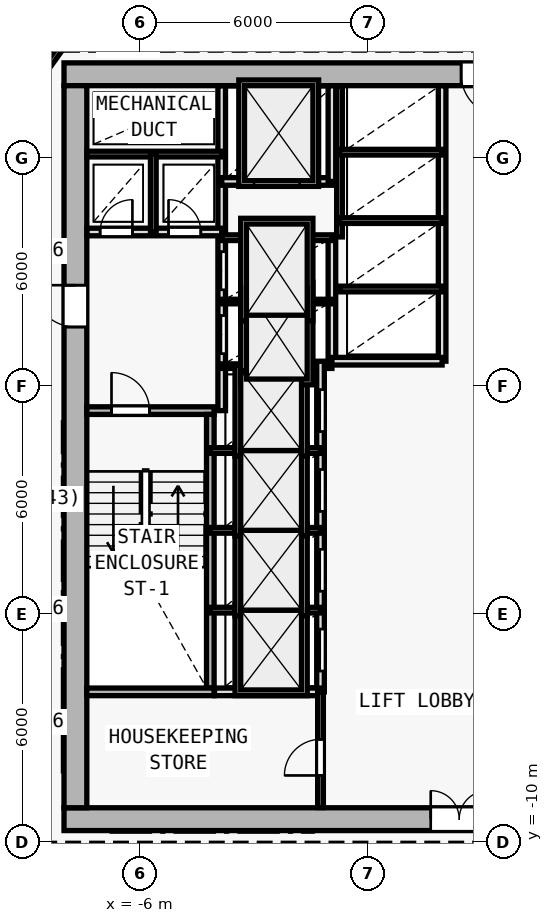
"""IFC4 building model, lengths in metres.
Left out: names, types, materials, properties, quantities, classifications, styles, units other than length and angle.
Written with IfcOpenShell. Run it as: python <this file> out.ifc"""

import sys

from ifc_helpers import new_model, si_unit, direction, frame, frame_2d, origin, origin_2d, place, context, subcontext, project, spatial, rectangle, i_section, extrude, element, fill, save


model = new_model("IFC4")
c1 = context("Model", 3, precision=1e-05, world=origin(), true_north=direction((0.0, 1.0)))
c2 = subcontext(c1, "Body", "Model", "MODEL_VIEW")
j1 = project(units=[si_unit("LENGTHUNIT", "METRE"), si_unit("PLANEANGLEUNIT", "RADIAN")], contexts=[c1])
p1 = place(None, origin())
s1 = spatial("IfcSite", under=j1, at=p1, CompositionType="ELEMENT")
p2 = place(p1, origin())
s2 = spatial("IfcBuilding", under=s1, at=p2, CompositionType="ELEMENT")
p3 = place(p2, frame((0.0, 0.0, 100.5)))
s3 = spatial("IfcBuildingStorey", under=s2, at=p3, CompositionType="ELEMENT", Elevation=100.5)
for number, where, z_axis, x_axis in (
    (1, (-7.7, -9.4, 0.0), (0.0, 0.0, 1.0), (1.0, 0.0, 0.0)),
    (2, (-7.7, 10.2, 0.0), (0.0, 0.0, 1.0), (1.0, 0.0, 0.0)),
    (3, (0.0, -9.4, 0.0), (0.0, 0.0, 1.0), (1.0, 0.0, 0.0)),
    (4, (-7.7, 2.0, 0.0), (0.0, 0.0, 1.0), (1.0, 0.0, 0.0)),
):
    element("IfcColumn", number, at=place(p3, frame(where, z_axis=z_axis, x_axis=x_axis)), inside=s3, PredefinedType="COLUMN", context=c2, shape_type="SweptSolid", body=[
        extrude(i_section(OverallWidth=0.409, OverallDepth=0.425, WebThickness=0.021, FlangeThickness=0.034, FilletRadius=0.015, at=origin_2d()), origin(), (0.0, 0.0, 1.0), 3.6),
    ])
p4 = place(p3, frame((-8.0, -9.4, 0.0), z_axis=(0.0, 0.0, 1.0), x_axis=(1.0, 0.0, 0.0)))
e5 = element("IfcWall", 5, at=p4, inside=s3, PredefinedType="SHEAR", context=c2, shape_type="SweptSolid", body=[
    extrude(rectangle(XDim=16.0, YDim=0.6, at=frame_2d((8.0, 0.0))), origin(), (0.0, 0.0, 1.0), 3.35),
])
p5 = place(p4, frame((9.65, 0.0, 0.0)))
e6 = element("IfcOpeningElement", 6, at=p5, cuts=e5, PredefinedType="OPENING", context=c2, shape_type="SweptSolid", body=[
    extrude(rectangle(XDim=1.5, YDim=2.2, at=frame_2d((0.75, 1.1))), frame((0.0, 0.31, 0.0), z_axis=(0.0, -1.0, 0.0), x_axis=(1.0, 0.0, 0.0)), (0.0, 0.0, 1.0), 0.62),
])
p6 = place(p3, frame((8.0, 10.2, 0.0), z_axis=(0.0, 0.0, 1.0), x_axis=(-1.0, 0.0, 0.0)))
e7 = element("IfcWall", 7, at=p6, inside=s3, PredefinedType="SHEAR", context=c2, shape_type="SweptSolid", body=[
    extrude(rectangle(XDim=16.0, YDim=0.6, at=frame_2d((8.0, 0.0))), origin(), (0.0, 0.0, 1.0), 3.35),
])
p7 = place(p6, frame((4.45, 0.0, 0.0)))
e8 = element("IfcOpeningElement", 8, at=p7, cuts=e7, PredefinedType="OPENING", context=c2, shape_type="SweptSolid", body=[
    extrude(rectangle(XDim=1.1, YDim=2.15, at=frame_2d((0.55, 1.075))), frame((0.0, 0.31, 0.0), z_axis=(0.0, -1.0, 0.0), x_axis=(1.0, 0.0, 0.0)), (0.0, 0.0, 1.0), 0.62),
])
p8 = place(p3, frame((-7.7, -9.1, 0.0), z_axis=(0.0, 0.0, 1.0), x_axis=(0.0, 1.0, 0.0)))
e9 = element("IfcWall", 9, at=p8, inside=s3, PredefinedType="SHEAR", context=c2, shape_type="SweptSolid", body=[
    extrude(rectangle(XDim=19.0, YDim=0.6, at=frame_2d((9.5, 0.0))), origin(), (0.0, 0.0, 1.0), 3.35),
])
p9 = place(p8, frame((12.65, 0.0, 0.0)))
e10 = element("IfcOpeningElement", 10, at=p9, cuts=e9, PredefinedType="OPENING", context=c2, shape_type="SweptSolid", body=[
    extrude(rectangle(XDim=1.1, YDim=2.15, at=frame_2d((0.55, 1.075))), frame((0.0, 0.31, 0.0), z_axis=(0.0, -1.0, 0.0), x_axis=(1.0, 0.0, 0.0)), (0.0, 0.0, 1.0), 0.62),
])
p10 = place(p3, frame((-7.4, 1.35, 0.0), z_axis=(0.0, 0.0, 1.0), x_axis=(1.0, 0.0, 0.0)))
e11 = element("IfcWall", 11, at=p10, inside=s3, PredefinedType="SOLIDWALL", context=c2, shape_type="SweptSolid", body=[
    extrude(rectangle(XDim=3.35, YDim=0.2, at=frame_2d((1.675, 0.0))), origin(), (0.0, 0.0, 1.0), 3.35),
])
p11 = place(p10, frame((0.65, 0.0, 0.0)))
e12 = element("IfcOpeningElement", 12, at=p11, cuts=e11, PredefinedType="OPENING", context=c2, shape_type="SweptSolid", body=[
    extrude(rectangle(XDim=1.0, YDim=2.15, at=frame_2d((0.5, 1.075))), frame((0.0, 0.11, 0.0), z_axis=(0.0, -1.0, 0.0), x_axis=(1.0, 0.0, 0.0)), (0.0, 0.0, 1.0), 0.22),
])
p12 = place(p3, frame((-4.15, -5.95, 0.0), z_axis=(0.0, 0.0, 1.0), x_axis=(0.0, 1.0, 0.0)))
e13 = element("IfcWall", 13, at=p12, inside=s3, PredefinedType="SOLIDWALL", context=c2, shape_type="SweptSolid", body=[
    extrude(rectangle(XDim=7.2, YDim=0.2, at=frame_2d((3.6, 0.0))), origin(), (0.0, 0.0, 1.0), 3.35),
])
p13 = place(p3, frame((-3.85, 1.35, 0.0), z_axis=(0.0, 0.0, 1.0), x_axis=(0.0, 1.0, 0.0)))
e14 = element("IfcWall", 14, at=p13, inside=s3, PredefinedType="SOLIDWALL", context=c2, shape_type="SweptSolid", body=[
    extrude(rectangle(XDim=8.545, YDim=0.2, at=frame_2d((4.272, 0.0))), origin(), (0.0, 0.0, 1.0), 3.35),
])
p14 = place(p13, frame((1.5, 0.0, 0.0)))
e15 = element("IfcOpeningElement", 15, at=p14, cuts=e14, PredefinedType="OPENING", context=c2, shape_type="SweptSolid", body=[
    extrude(rectangle(XDim=1.0, YDim=2.15, at=frame_2d((0.5, 1.075))), frame((0.0, 0.11, 0.0), z_axis=(0.0, -1.0, 0.0), x_axis=(1.0, 0.0, 0.0)), (0.0, 0.0, 1.0), 0.22),
])
p15 = place(p13, frame((3.18, 0.0, 0.0)))
e16 = element("IfcOpeningElement", 16, at=p15, cuts=e14, PredefinedType="OPENING", context=c2, shape_type="SweptSolid", body=[
    extrude(rectangle(XDim=1.0, YDim=2.15, at=frame_2d((0.5, 1.075))), frame((0.0, 0.11, 0.0), z_axis=(0.0, -1.0, 0.0), x_axis=(1.0, 0.0, 0.0)), (0.0, 0.0, 1.0), 0.22),
])
p16 = place(p3, frame((-7.395, 6.05, 0.0), z_axis=(0.0, 0.0, 1.0), x_axis=(1.0, 0.0, 0.0)))
e17 = element("IfcWall", 17, at=p16, inside=s3, PredefinedType="SOLIDWALL", context=c2, shape_type="SweptSolid", body=[
    extrude(rectangle(XDim=3.545, YDim=0.2, at=frame_2d((1.772, 0.0))), origin(), (0.0, 0.0, 1.0), 3.35),
])
p17 = place(p16, frame((0.345, 0.0, 0.0)))
e18 = element("IfcOpeningElement", 18, at=p17, cuts=e17, PredefinedType="OPENING", context=c2, shape_type="SweptSolid", body=[
    extrude(rectangle(XDim=0.85, YDim=2.1, at=frame_2d((0.425, 1.05))), frame((0.0, 0.11, 0.0), z_axis=(0.0, -1.0, 0.0), x_axis=(1.0, 0.0, 0.0)), (0.0, 0.0, 1.0), 0.22),
])
p18 = place(p16, frame((2.145, 0.0, 0.0)))
e19 = element("IfcOpeningElement", 19, at=p18, cuts=e17, PredefinedType="OPENING", context=c2, shape_type="SweptSolid", body=[
    extrude(rectangle(XDim=0.85, YDim=2.1, at=frame_2d((0.425, 1.05))), frame((0.0, 0.11, 0.0), z_axis=(0.0, -1.0, 0.0), x_axis=(1.0, 0.0, 0.0)), (0.0, 0.0, 1.0), 0.22),
])
p19 = place(p3, frame((-7.395, 8.1, 0.0), z_axis=(0.0, 0.0, 1.0), x_axis=(1.0, 0.0, 0.0)))
e20 = element("IfcWall", 20, at=p19, inside=s3, PredefinedType="PARTITIONING", context=c2, shape_type="SweptSolid", body=[
    extrude(rectangle(XDim=3.545, YDim=0.15, at=frame_2d((1.772, 0.0))), origin(), (0.0, 0.0, 1.0), 3.35),
])
p20 = place(p3, frame((-5.65, 6.05, 0.0), z_axis=(0.0, 0.0, 1.0), x_axis=(0.0, 1.0, 0.0)))
e21 = element("IfcWall", 21, at=p20, inside=s3, PredefinedType="PARTITIONING", context=c2, shape_type="SweptSolid", body=[
    extrude(rectangle(XDim=2.05, YDim=0.15, at=frame_2d((1.025, 0.0))), origin(), (0.0, 0.0, 1.0), 3.35),
])
p21 = place(p3, frame((-0.95, 2.65, 0.0), z_axis=(0.0, 0.0, 1.0), x_axis=(0.0, 1.0, 0.0)))
e22 = element("IfcWall", 22, at=p21, inside=s3, PredefinedType="SOLIDWALL", context=c2, shape_type="SweptSolid", body=[
    extrude(rectangle(XDim=3.27, YDim=0.2, at=frame_2d((1.635, 0.0))), origin(), (0.0, 0.0, 1.0), 3.35),
])
for number, where, z_axis, x_axis in (
    (23, (-3.85, 2.52, 0.0), (0.0, 0.0, 1.0), (1.0, 0.0, 0.0)),
    (24, (-3.85, 4.22, 0.0), (0.0, 0.0, 1.0), (1.0, 0.0, 0.0)),
):
    element("IfcWall", number, at=place(p3, frame(where, z_axis=z_axis, x_axis=x_axis)), inside=s3, PredefinedType="PARTITIONING", context=c2, shape_type="SweptSolid", body=[
        extrude(rectangle(XDim=2.9, YDim=0.12, at=frame_2d((1.45, 0.0))), origin(), (0.0, 0.0, 1.0), 3.35),
    ])
p22 = place(p3, frame((-3.85, 5.9, 0.0), z_axis=(0.0, 0.0, 1.0), x_axis=(1.0, 0.0, 0.0)))
e25 = element("IfcWall", 25, at=p22, inside=s3, PredefinedType="PARTITIONING", context=c2, shape_type="SweptSolid", body=[
    extrude(rectangle(XDim=2.9, YDim=0.15, at=frame_2d((1.45, 0.0))), origin(), (0.0, 0.0, 1.0), 3.35),
])
p23 = place(p3, frame((-3.85, 7.38, 0.0), z_axis=(0.0, 0.0, 1.0), x_axis=(1.0, 0.0, 0.0)))
e26 = element("IfcWall", 26, at=p23, inside=s3, PredefinedType="SOLIDWALL", context=c2, shape_type="SweptSolid", body=[
    extrude(rectangle(XDim=2.9, YDim=0.2, at=frame_2d((1.45, 0.0))), origin(), (0.0, 0.0, 1.0), 3.35),
])
p24 = place(p23, frame((0.85, 0.0, 0.0)))
e27 = element("IfcOpeningElement", 27, at=p24, cuts=e26, PredefinedType="OPENING", context=c2, shape_type="SweptSolid", body=[
    extrude(rectangle(XDim=1.2, YDim=2.2, at=frame_2d((0.6, 1.1))), frame((0.0, 0.11, 0.0), z_axis=(0.0, -1.0, 0.0), x_axis=(1.0, 0.0, 0.0)), (0.0, 0.0, 1.0), 0.22),
])
p25 = place(p3, frame((-0.95, 7.38, 0.0), z_axis=(0.0, 0.0, 1.0), x_axis=(0.0, 1.0, 0.0)))
e28 = element("IfcWall", 28, at=p25, inside=s3, PredefinedType="SOLIDWALL", context=c2, shape_type="SweptSolid", body=[
    extrude(rectangle(XDim=2.515, YDim=0.2, at=frame_2d((1.258, 0.0))), origin(), (0.0, 0.0, 1.0), 3.35),
])
p26 = place(p3, frame((-1.25, -6.05, 0.0), z_axis=(0.0, 0.0, 1.0), x_axis=(0.0, 1.0, 0.0)))
e29 = element("IfcWall", 29, at=p26, inside=s3, PredefinedType="SOLIDWALL", context=c2, shape_type="SweptSolid", body=[
    extrude(rectangle(XDim=8.7, YDim=0.2, at=frame_2d((4.35, 0.0))), origin(), (0.0, 0.0, 1.0), 3.35),
])
p27 = place(p26, frame((0.55, 0.0, 0.0)))
e30 = element("IfcOpeningElement", 30, at=p27, cuts=e29, PredefinedType="OPENING", context=c2, shape_type="SweptSolid", body=[
    extrude(rectangle(XDim=1.1, YDim=2.15, at=frame_2d((0.55, 1.075))), frame((0.0, 0.11, 0.0), z_axis=(0.0, -1.0, 0.0), x_axis=(1.0, 0.0, 0.0)), (0.0, 0.0, 1.0), 0.22),
])
p28 = place(p26, frame((2.65, 0.0, 0.0)))
e31 = element("IfcOpeningElement", 31, at=p28, cuts=e29, PredefinedType="OPENING", context=c2, shape_type="SweptSolid", body=[
    extrude(rectangle(XDim=1.1, YDim=2.15, at=frame_2d((0.55, 1.075))), frame((0.0, 0.11, 0.0), z_axis=(0.0, -1.0, 0.0), x_axis=(1.0, 0.0, 0.0)), (0.0, 0.0, 1.0), 0.22),
])
p29 = place(p26, frame((4.75, 0.0, 0.0)))
e32 = element("IfcOpeningElement", 32, at=p29, cuts=e29, PredefinedType="OPENING", context=c2, shape_type="SweptSolid", body=[
    extrude(rectangle(XDim=1.1, YDim=2.15, at=frame_2d((0.55, 1.075))), frame((0.0, 0.11, 0.0), z_axis=(0.0, -1.0, 0.0), x_axis=(1.0, 0.0, 0.0)), (0.0, 0.0, 1.0), 0.22),
])
p30 = place(p26, frame((6.85, 0.0, 0.0)))
e33 = element("IfcOpeningElement", 33, at=p30, cuts=e29, PredefinedType="OPENING", context=c2, shape_type="SweptSolid", body=[
    extrude(rectangle(XDim=1.1, YDim=2.15, at=frame_2d((0.55, 1.075))), frame((0.0, 0.11, 0.0), z_axis=(0.0, -1.0, 0.0), x_axis=(1.0, 0.0, 0.0)), (0.0, 0.0, 1.0), 0.22),
])
for number, where, z_axis, x_axis in (
    (34, (-4.15, -3.9, 0.0), (0.0, 0.0, 1.0), (1.0, 0.0, 0.0)),
    (35, (-4.15, -1.8, 0.0), (0.0, 0.0, 1.0), (1.0, 0.0, 0.0)),
    (36, (-4.15, 0.3, 0.0), (0.0, 0.0, 1.0), (1.0, 0.0, 0.0)),
):
    element("IfcWall", number, at=place(p3, frame(where, z_axis=z_axis, x_axis=x_axis)), inside=s3, PredefinedType="PARTITIONING", context=c2, shape_type="SweptSolid", body=[
        extrude(rectangle(XDim=2.9, YDim=0.15, at=frame_2d((1.45, 0.0))), origin(), (0.0, 0.0, 1.0), 3.35),
    ])
p31 = place(p3, frame((1.95, 2.65, 0.0), z_axis=(0.0, 0.0, 1.0), x_axis=(0.0, 1.0, 0.0)))
e37 = element("IfcWall", 37, at=p31, inside=s3, PredefinedType="SOLIDWALL", context=c2, shape_type="SweptSolid", body=[
    extrude(rectangle(XDim=7.245, YDim=0.2, at=frame_2d((3.623, 0.0))), origin(), (0.0, 0.0, 1.0), 3.35),
])
p32 = place(p3, frame((-0.95, 2.65, 0.0), z_axis=(0.0, 0.0, 1.0), x_axis=(1.0, 0.0, 0.0)))
e38 = element("IfcWall", 38, at=p32, inside=s3, PredefinedType="SOLIDWALL", context=c2, shape_type="SweptSolid", body=[
    extrude(rectangle(XDim=2.9, YDim=0.2, at=frame_2d((1.45, 0.0))), origin(), (0.0, 0.0, 1.0), 3.35),
])
p33 = place(p3, frame((-0.75, 5.92, 0.0), z_axis=(0.0, 0.0, 1.0), x_axis=(0.0, 1.0, 0.0)))
e39 = element("IfcWall", 39, at=p33, inside=s3, PredefinedType="PARTITIONING", context=c2, shape_type="SweptSolid", body=[
    extrude(rectangle(XDim=3.975, YDim=0.15, at=frame_2d((1.988, 0.0))), origin(), (0.0, 0.0, 1.0), 3.35),
])
for number, where, z_axis, x_axis in (
    (40, (-0.75, 4.55, 0.0), (0.0, 0.0, 1.0), (1.0, 0.0, 0.0)),
    (41, (-0.75, 6.35, 0.0), (0.0, 0.0, 1.0), (1.0, 0.0, 0.0)),
    (42, (-0.75, 8.15, 0.0), (0.0, 0.0, 1.0), (1.0, 0.0, 0.0)),
):
    element("IfcWall", number, at=place(p3, frame(where, z_axis=z_axis, x_axis=x_axis)), inside=s3, PredefinedType="PARTITIONING", context=c2, shape_type="SweptSolid", body=[
        extrude(rectangle(XDim=2.7, YDim=0.15, at=frame_2d((1.35, 0.0))), origin(), (0.0, 0.0, 1.0), 3.35),
    ])
p34 = place(p3, frame((-7.4, -6.05, 0.0), z_axis=(0.0, 0.0, 1.0), x_axis=(1.0, 0.0, 0.0)))
e43 = element("IfcWall", 43, at=p34, inside=s3, PredefinedType="SOLIDWALL", context=c2, shape_type="SweptSolid", body=[
    extrude(rectangle(XDim=3.35, YDim=0.2, at=frame_2d((1.675, 0.0))), origin(), (0.0, 0.0, 1.0), 3.35),
])
p35 = place(p3, frame((-4.04, -6.05, 0.0), z_axis=(0.0, 0.0, 1.0), x_axis=(1.0, 0.0, 0.0)))
e44 = element("IfcWall", 44, at=p35, inside=s3, PredefinedType="SOLIDWALL", context=c2, shape_type="SweptSolid", body=[
    extrude(rectangle(XDim=2.79, YDim=0.2, at=frame_2d((1.395, 0.0))), origin(), (0.0, 0.0, 1.0), 3.35),
])
p36 = place(p3, frame((-1.25, -9.095, 0.0), z_axis=(0.0, 0.0, 1.0), x_axis=(0.0, 1.0, 0.0)))
e45 = element("IfcWall", 45, at=p36, inside=s3, PredefinedType="PARTITIONING", context=c2, shape_type="SweptSolid", body=[
    extrude(rectangle(XDim=3.045, YDim=0.15, at=frame_2d((1.522, 0.0))), origin(), (0.0, 0.0, 1.0), 3.35),
])
p37 = place(p36, frame((0.845, 0.0, 0.0)))
e46 = element("IfcOpeningElement", 46, at=p37, cuts=e45, PredefinedType="OPENING", context=c2, shape_type="SweptSolid", body=[
    extrude(rectangle(XDim=0.95, YDim=2.1, at=frame_2d((0.475, 1.05))), frame((0.0, 0.085, 0.0), z_axis=(0.0, -1.0, 0.0), x_axis=(1.0, 0.0, 0.0)), (0.0, 0.0, 1.0), 0.17),
])
p38 = place(p3, frame((-9.86, 8.426, 0.0), z_axis=(0.0, 0.0, 1.0), x_axis=(0.582449511476, 0.812866881218, 0.0)))
e47 = element("IfcWall", 47, at=p38, inside=s3, PredefinedType="PARTITIONING", context=c2, shape_type="SweptSolid", body=[
    extrude(rectangle(XDim=4.84, YDim=0.15, at=frame_2d((2.42, 0.0))), origin(), (0.0, 0.0, 1.0), 2.965),
])
p39 = place(p38, frame((3.046, 0.0, 0.0)))
e48 = element("IfcOpeningElement", 48, at=p39, cuts=e47, PredefinedType="OPENING", context=c2, shape_type="SweptSolid", body=[
    extrude(rectangle(XDim=0.9, YDim=2.1, at=frame_2d((0.45, 1.05))), frame((0.0, 0.085, 0.0), z_axis=(0.0, -1.0, 0.0), x_axis=(1.0, 0.0, 0.0)), (0.0, 0.0, 1.0), 0.17),
])
p40 = place(p5, origin())
e49 = element("IfcDoor", 49, at=p40, inside=s3, OperationType="DOUBLE_DOOR_SINGLE_SWING", PredefinedType="DOOR", context=c2, shape_type="SweptSolid", body=[
    extrude(rectangle(XDim=1.5, YDim=2.2, at=frame_2d((0.75, 1.1))), frame((0.0, 0.025, 0.0), z_axis=(0.0, -1.0, 0.0), x_axis=(1.0, 0.0, 0.0)), (0.0, 0.0, 1.0), 0.05),
])
fill(e6, e49)
p41 = place(p9, origin())
e50 = element("IfcDoor", 50, at=p41, inside=s3, OperationType="SINGLE_SWING_RIGHT", PredefinedType="DOOR", context=c2, shape_type="SweptSolid", body=[
    extrude(rectangle(XDim=1.1, YDim=2.15, at=frame_2d((0.55, 1.075))), frame((0.0, 0.025, 0.0), z_axis=(0.0, -1.0, 0.0), x_axis=(1.0, 0.0, 0.0)), (0.0, 0.0, 1.0), 0.05),
])
fill(e10, e50)
p42 = place(p7, origin())
e51 = element("IfcDoor", 51, at=p42, inside=s3, OperationType="SINGLE_SWING_LEFT", PredefinedType="DOOR", context=c2, shape_type="SweptSolid", body=[
    extrude(rectangle(XDim=1.1, YDim=2.15, at=frame_2d((0.55, 1.075))), frame((0.0, 0.025, 0.0), z_axis=(0.0, -1.0, 0.0), x_axis=(1.0, 0.0, 0.0)), (0.0, 0.0, 1.0), 0.05),
])
fill(e8, e51)
p43 = place(p11, origin())
e52 = element("IfcDoor", 52, at=p43, inside=s3, OperationType="SINGLE_SWING_LEFT", PredefinedType="DOOR", context=c2, shape_type="SweptSolid", body=[
    extrude(rectangle(XDim=1.0, YDim=2.15, at=frame_2d((0.5, 1.075))), frame((0.0, 0.025, 0.0), z_axis=(0.0, -1.0, 0.0), x_axis=(1.0, 0.0, 0.0)), (0.0, 0.0, 1.0), 0.05),
])
fill(e12, e52)
p44 = place(p17, origin())
e53 = element("IfcDoor", 53, at=p44, inside=s3, OperationType="SINGLE_SWING_RIGHT", PredefinedType="DOOR", context=c2, shape_type="SweptSolid", body=[
    extrude(rectangle(XDim=0.85, YDim=2.1, at=frame_2d((0.425, 1.05))), frame((0.0, 0.025, 0.0), z_axis=(0.0, -1.0, 0.0), x_axis=(1.0, 0.0, 0.0)), (0.0, 0.0, 1.0), 0.05),
])
fill(e18, e53)
p45 = place(p18, origin())
e54 = element("IfcDoor", 54, at=p45, inside=s3, OperationType="SINGLE_SWING_LEFT", PredefinedType="DOOR", context=c2, shape_type="SweptSolid", body=[
    extrude(rectangle(XDim=0.85, YDim=2.1, at=frame_2d((0.425, 1.05))), frame((0.0, 0.025, 0.0), z_axis=(0.0, -1.0, 0.0), x_axis=(1.0, 0.0, 0.0)), (0.0, 0.0, 1.0), 0.05),
])
fill(e19, e54)
p46 = place(p24, origin())
e55 = element("IfcDoor", 55, at=p46, inside=s3, OperationType="DOUBLE_DOOR_SLIDING", PredefinedType="DOOR", context=c2, shape_type="SweptSolid", body=[
    extrude(rectangle(XDim=1.2, YDim=2.2, at=frame_2d((0.6, 1.1))), frame((0.0, 0.025, 0.0), z_axis=(0.0, -1.0, 0.0), x_axis=(1.0, 0.0, 0.0)), (0.0, 0.0, 1.0), 0.05),
])
fill(e27, e55)
p47 = place(p27, origin())
e56 = element("IfcDoor", 56, at=p47, inside=s3, OperationType="DOUBLE_DOOR_SLIDING", PredefinedType="DOOR", context=c2, shape_type="SweptSolid", body=[
    extrude(rectangle(XDim=1.1, YDim=2.15, at=frame_2d((0.55, 1.075))), frame((0.0, 0.025, 0.0), z_axis=(0.0, -1.0, 0.0), x_axis=(1.0, 0.0, 0.0)), (0.0, 0.0, 1.0), 0.05),
])
fill(e30, e56)
p48 = place(p28, origin())
e57 = element("IfcDoor", 57, at=p48, inside=s3, OperationType="DOUBLE_DOOR_SLIDING", PredefinedType="DOOR", context=c2, shape_type="SweptSolid", body=[
    extrude(rectangle(XDim=1.1, YDim=2.15, at=frame_2d((0.55, 1.075))), frame((0.0, 0.025, 0.0), z_axis=(0.0, -1.0, 0.0), x_axis=(1.0, 0.0, 0.0)), (0.0, 0.0, 1.0), 0.05),
])
fill(e31, e57)
p49 = place(p29, origin())
e58 = element("IfcDoor", 58, at=p49, inside=s3, OperationType="DOUBLE_DOOR_SLIDING", PredefinedType="DOOR", context=c2, shape_type="SweptSolid", body=[
    extrude(rectangle(XDim=1.1, YDim=2.15, at=frame_2d((0.55, 1.075))), frame((0.0, 0.025, 0.0), z_axis=(0.0, -1.0, 0.0), x_axis=(1.0, 0.0, 0.0)), (0.0, 0.0, 1.0), 0.05),
])
fill(e32, e58)
p50 = place(p30, origin())
e59 = element("IfcDoor", 59, at=p50, inside=s3, OperationType="DOUBLE_DOOR_SLIDING", PredefinedType="DOOR", context=c2, shape_type="SweptSolid", body=[
    extrude(rectangle(XDim=1.1, YDim=2.15, at=frame_2d((0.55, 1.075))), frame((0.0, 0.025, 0.0), z_axis=(0.0, -1.0, 0.0), x_axis=(1.0, 0.0, 0.0)), (0.0, 0.0, 1.0), 0.05),
])
fill(e33, e59)
p51 = place(p14, origin())
e60 = element("IfcDoor", 60, at=p51, inside=s3, OperationType="DOUBLE_DOOR_SLIDING", PredefinedType="DOOR", context=c2, shape_type="SweptSolid", body=[
    extrude(rectangle(XDim=1.0, YDim=2.15, at=frame_2d((0.5, 1.075))), frame((0.0, 0.025, 0.0), z_axis=(0.0, -1.0, 0.0), x_axis=(1.0, 0.0, 0.0)), (0.0, 0.0, 1.0), 0.05),
])
fill(e15, e60)
p52 = place(p15, origin())
e61 = element("IfcDoor", 61, at=p52, inside=s3, OperationType="DOUBLE_DOOR_SLIDING", PredefinedType="DOOR", context=c2, shape_type="SweptSolid", body=[
    extrude(rectangle(XDim=1.0, YDim=2.15, at=frame_2d((0.5, 1.075))), frame((0.0, 0.025, 0.0), z_axis=(0.0, -1.0, 0.0), x_axis=(1.0, 0.0, 0.0)), (0.0, 0.0, 1.0), 0.05),
])
fill(e16, e61)
p53 = place(p37, origin())
e62 = element("IfcDoor", 62, at=p53, inside=s3, OperationType="SINGLE_SWING_LEFT", PredefinedType="DOOR", context=c2, shape_type="SweptSolid", body=[
    extrude(rectangle(XDim=0.95, YDim=2.1, at=frame_2d((0.475, 1.05))), frame((0.0, 0.025, 0.0), z_axis=(0.0, -1.0, 0.0), x_axis=(1.0, 0.0, 0.0)), (0.0, 0.0, 1.0), 0.05),
])
fill(e46, e62)
save(model, sys.argv[1])
